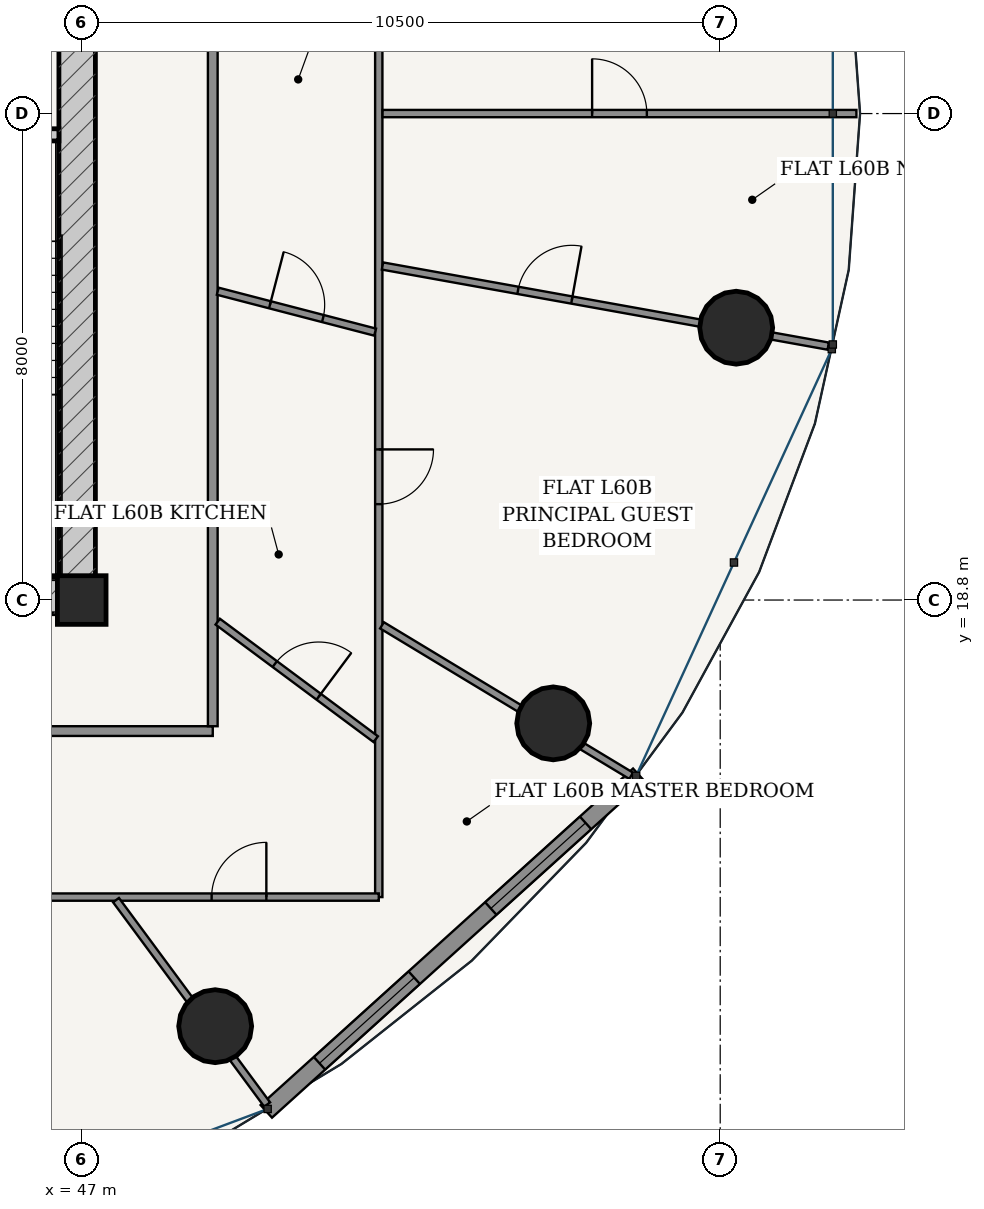
"""IFC4 building model, lengths in metres.
Left out: names, types, materials, properties, quantities, classifications, styles, units other than length and angle.
Written with IfcOpenShell. Run it as: python <this file> out.ifc"""

import sys

from ifc_helpers import new_model, si_unit, direction, frame, frame_2d, origin, origin_2d, place, context, subcontext, project, spatial, rectangle, hollow_circle, extrude, source, transform, mapped, element, fill, save


model = new_model("IFC4")
c1 = context("Model", 3, precision=1e-05, world=origin(), true_north=direction((-0.2419218956, 0.970295726276)))
c2 = subcontext(c1, "Body", "Model", "MODEL_VIEW")
j1 = project(units=[si_unit("LENGTHUNIT", "METRE"), si_unit("PLANEANGLEUNIT", "RADIAN")], contexts=[c1])
p1 = place(None, origin())
s1 = spatial("IfcSite", under=j1, at=p1, CompositionType="ELEMENT")
p2 = place(p1, origin())
s2 = spatial("IfcBuilding", under=s1, at=p2, CompositionType="ELEMENT")
p3 = place(p2, frame((0.0, 0.0, 228.2)))
s3 = spatial("IfcBuildingStorey", under=s2, at=p3, CompositionType="ELEMENT", Elevation=228.2)
p4 = place(p3, frame((47.0, 18.8, 0.0), z_axis=(0.0, 0.0, 1.0), x_axis=(1.0, 0.0, 0.0)))
e1 = element("IfcColumn", 1, at=p4, inside=s3, PredefinedType="COLUMN", context=c2, shape_type="SweptSolid", body=[
    extrude(rectangle(XDim=0.8, YDim=0.8, at=origin_2d()), origin(), (0.0, 0.0, 1.0), 3.7),
])
p5 = place(p3, frame((28.775, 18.875, 0.0), z_axis=(0.0, 0.0, 1.0), x_axis=(1.0, 0.0, 0.0)))
e2 = element("IfcWall", 2, at=p5, inside=s3, PredefinedType="SHEAR", context=c2, shape_type="SweptSolid", body=[
    extrude(rectangle(XDim=18.45, YDim=0.6, at=frame_2d((9.225, 0.0))), origin(), (0.0, 0.0, 1.0), 3.435),
])
p6 = place(p5, frame((8.8, 0.0, 0.0)))
e3 = element("IfcOpeningElement", 3, at=p6, cuts=e2, PredefinedType="OPENING", context=c2, shape_type="SweptSolid", body=[
    extrude(rectangle(XDim=0.85, YDim=2.1, at=frame_2d((0.425, 1.05))), frame((0.0, 0.31, 0.0), z_axis=(0.0, -1.0, 0.0), x_axis=(1.0, 0.0, 0.0)), (0.0, 0.0, 1.0), 0.62),
])
p7 = place(p3, frame((46.925, 19.175, 0.0), z_axis=(0.0, 0.0, 1.0), x_axis=(0.0, 1.0, 0.0)))
e4 = element("IfcWall", 4, at=p7, inside=s3, PredefinedType="SHEAR", context=c2, shape_type="SweptSolid", body=[
    extrude(rectangle(XDim=15.25, YDim=0.6, at=frame_2d((7.625, 0.0))), origin(), (0.0, 0.0, 1.0), 3.435),
])
p8 = place(p7, frame((9.875, 0.0, 0.0)))
e5 = element("IfcOpeningElement", 5, at=p8, cuts=e4, PredefinedType="OPENING", context=c2, shape_type="SweptSolid", body=[
    extrude(rectangle(XDim=1.5, YDim=2.2, at=frame_2d((0.75, 1.1))), frame((0.0, 0.31, 0.0), z_axis=(0.0, -1.0, 0.0), x_axis=(1.0, 0.0, 0.0)), (0.0, 0.0, 1.0), 0.62),
])
p9 = place(p3, frame((43.305, 26.45, 0.0), z_axis=(0.0, 0.0, 1.0), x_axis=(1.0, 0.0, 0.0)))
e6 = element("IfcWall", 6, at=p9, inside=s3, PredefinedType="SOLIDWALL", context=c2, shape_type="SweptSolid", body=[
    extrude(rectangle(XDim=3.32, YDim=0.2, at=frame_2d((1.66, 0.0))), origin(), (0.0, 0.0, 1.0), 3.435),
])
p10 = place(p9, frame((1.185, 0.0, 0.0)))
e7 = element("IfcOpeningElement", 7, at=p10, cuts=e6, PredefinedType="OPENING", context=c2, shape_type="SweptSolid", body=[
    extrude(rectangle(XDim=0.95, YDim=2.15, at=frame_2d((0.475, 1.075))), frame((0.0, 0.11, 0.0), z_axis=(0.0, -1.0, 0.0), x_axis=(1.0, 0.0, 0.0)), (0.0, 0.0, 1.0), 0.22),
])
for number, where, z_axis, x_axis in (
    (8, (49.195, 11.792, 0.0), (0.0, 0.0, 1.0), (1.0, 0.0, 0.0)),
    (9, (54.754, 16.772, 0.0), (0.0, 0.0, 1.0), (1.0, 0.0, 0.0)),
    (10, (57.763, 23.279, 0.0), (0.0, 0.0, 1.0), (1.0, 0.0, 0.0)),
):
    element("IfcColumn", number, at=place(p3, frame(where, z_axis=z_axis, x_axis=x_axis)), inside=s3, PredefinedType="COLUMN", context=c2, shape_type="SweptSolid", body=[
        extrude(hollow_circle(Radius=0.6, WallThickness=0.038, at=origin_2d()), origin(), (0.0, 0.0, 1.0), 3.7),
    ])
p11 = place(p3, frame((50.035, 10.391, 0.0), z_axis=(0.0, 0.0, 1.0), x_axis=(0.741986838603, 0.670414447443, 0.0)))
e11 = element("IfcWall", 11, at=p11, inside=s3, PredefinedType="SOLIDWALL", context=c2, shape_type="SweptSolid", body=[
    extrude(rectangle(XDim=8.255, YDim=0.28, at=frame_2d((4.127, 0.0))), origin(), (0.0, 0.0, 1.0), 3.435),
])
p12 = place(p11, frame((1.179, 0.0, 0.85)))
e12 = element("IfcOpeningElement", 12, at=p12, cuts=e11, PredefinedType="OPENING", context=c2, shape_type="SweptSolid", body=[
    extrude(rectangle(XDim=2.1, YDim=1.95, at=frame_2d((1.05, 0.975))), frame((0.0, 0.15, 0.0), z_axis=(0.0, -1.0, 0.0), x_axis=(1.0, 0.0, 0.0)), (0.0, 0.0, 1.0), 0.3),
])
p13 = place(p11, frame((4.976, 0.0, 0.85)))
e13 = element("IfcOpeningElement", 13, at=p13, cuts=e11, PredefinedType="OPENING", context=c2, shape_type="SweptSolid", body=[
    extrude(rectangle(XDim=2.1, YDim=1.95, at=frame_2d((1.05, 0.975))), frame((0.0, 0.15, 0.0), z_axis=(0.0, -1.0, 0.0), x_axis=(1.0, 0.0, 0.0)), (0.0, 0.0, 1.0), 0.3),
])
p14 = place(p3, frame((34.32, 16.645, 0.0), z_axis=(0.0, 0.0, 1.0), x_axis=(1.0, 0.0, 0.0)))
e14 = element("IfcWall", 14, at=p14, inside=s3, PredefinedType="PARTITIONING", context=c2, shape_type="SweptSolid", body=[
    extrude(rectangle(XDim=14.835, YDim=0.16, at=frame_2d((7.417, 0.0))), origin(), (0.0, 0.0, 1.0), 2.951),
])
p15 = place(p14, frame((10.135, 0.0, 0.0)))
e15 = element("IfcOpeningElement", 15, at=p15, cuts=e14, PredefinedType="OPENING", context=c2, shape_type="SweptSolid", body=[
    extrude(rectangle(XDim=0.98, YDim=2.2, at=frame_2d((0.49, 1.1))), frame((0.0, 0.09, 0.0), z_axis=(0.0, -1.0, 0.0), x_axis=(1.0, 0.0, 0.0)), (0.0, 0.0, 1.0), 0.18),
])
p16 = place(p3, frame((49.155, 16.725, 0.0), z_axis=(0.0, 0.0, 1.0), x_axis=(0.0, 1.0, 0.0)))
e16 = element("IfcWall", 16, at=p16, inside=s3, PredefinedType="PARTITIONING", context=c2, shape_type="SweptSolid", body=[
    extrude(rectangle(XDim=18.3, YDim=0.16, at=frame_2d((9.15, 0.0))), origin(), (0.0, 0.0, 1.0), 2.951),
])
p17 = place(p3, frame((51.885, 37.835, 0.0), z_axis=(0.0, 0.0, 1.0), x_axis=(0.0, -1.0, 0.0)))
e17 = element("IfcWall", 17, at=p17, inside=s3, PredefinedType="PARTITIONING", context=c2, shape_type="SweptSolid", body=[
    extrude(rectangle(XDim=23.92, YDim=0.12, at=frame_2d((11.96, 0.0))), origin(), (0.0, 0.0, 1.0), 2.951),
])
p18 = place(p17, frame((16.558, 0.0, 0.0)))
e18 = element("IfcOpeningElement", 18, at=p18, cuts=e17, PredefinedType="OPENING", context=c2, shape_type="SweptSolid", body=[
    extrude(rectangle(XDim=0.9, YDim=2.15, at=frame_2d((0.45, 1.075))), frame((0.0, 0.07, 0.0), z_axis=(0.0, -1.0, 0.0), x_axis=(1.0, 0.0, 0.0)), (0.0, 0.0, 1.0), 0.14),
])
p19 = place(p3, frame((51.885, 13.915, 0.0), z_axis=(0.0, 0.0, 1.0), x_axis=(-1.0, 0.0, 0.0)))
e19 = element("IfcWall", 19, at=p19, inside=s3, PredefinedType="PARTITIONING", context=c2, shape_type="SweptSolid", body=[
    extrude(rectangle(XDim=16.619, YDim=0.12, at=frame_2d((8.31, 0.0))), origin(), (0.0, 0.0, 1.0), 2.951),
])
p20 = place(p19, frame((6.797, 0.0, 0.0)))
e20 = element("IfcOpeningElement", 20, at=p20, cuts=e19, PredefinedType="OPENING", context=c2, shape_type="SweptSolid", body=[
    extrude(rectangle(XDim=0.9, YDim=2.15, at=frame_2d((0.45, 1.075))), frame((0.0, 0.07, 0.0), z_axis=(0.0, -1.0, 0.0), x_axis=(1.0, 0.0, 0.0)), (0.0, 0.0, 1.0), 0.14),
])
p21 = place(p19, frame((1.849, 0.0, 0.0)))
e21 = element("IfcOpeningElement", 21, at=p21, cuts=e19, PredefinedType="OPENING", context=c2, shape_type="SweptSolid", body=[
    extrude(rectangle(XDim=0.9, YDim=2.15, at=frame_2d((0.45, 1.075))), frame((0.0, 0.07, 0.0), z_axis=(0.0, -1.0, 0.0), x_axis=(1.0, 0.0, 0.0)), (0.0, 0.0, 1.0), 0.14),
])
p22 = place(p3, frame((47.564, 13.865, 0.0), z_axis=(0.0, 0.0, 1.0), x_axis=(0.594501071103, -0.804094818076, 0.0)))
e22 = element("IfcWall", 22, at=p22, inside=s3, PredefinedType="PARTITIONING", context=c2, shape_type="SweptSolid", body=[
    extrude(rectangle(XDim=4.181, YDim=0.12, at=frame_2d((2.09, 0.0))), origin(), (0.0, 0.0, 1.0), 2.951),
])
p23 = place(p3, frame((51.938, 18.384, 0.0), z_axis=(0.0, 0.0, 1.0), x_axis=(0.856058483833, -0.516878972543, 0.0)))
e23 = element("IfcWall", 23, at=p23, inside=s3, PredefinedType="PARTITIONING", context=c2, shape_type="SweptSolid", body=[
    extrude(rectangle(XDim=4.787, YDim=0.12, at=frame_2d((2.393, 0.0))), origin(), (0.0, 0.0, 1.0), 2.951),
])
p24 = place(p3, frame((51.946, 24.293, 0.0), z_axis=(0.0, 0.0, 1.0), x_axis=(0.984227185588, -0.176909149424, 0.0)))
e24 = element("IfcWall", 24, at=p24, inside=s3, PredefinedType="PARTITIONING", context=c2, shape_type="SweptSolid", body=[
    extrude(rectangle(XDim=7.448, YDim=0.12, at=frame_2d((3.724, 0.0))), origin(), (0.0, 0.0, 1.0), 2.951),
])
p25 = place(p24, frame((2.264, 0.0, 0.0)))
e25 = element("IfcOpeningElement", 25, at=p25, cuts=e24, PredefinedType="OPENING", context=c2, shape_type="SweptSolid", body=[
    extrude(rectangle(XDim=0.9, YDim=2.15, at=frame_2d((0.45, 1.075))), frame((0.0, 0.07, 0.0), z_axis=(0.0, -1.0, 0.0), x_axis=(1.0, 0.0, 0.0)), (0.0, 0.0, 1.0), 0.14),
])
p26 = place(p3, frame((51.947, 26.8, 0.0), z_axis=(0.0, 0.0, 1.0), x_axis=(1.0, 0.0, 0.0)))
e26 = element("IfcWall", 26, at=p26, inside=s3, PredefinedType="PARTITIONING", context=c2, shape_type="SweptSolid", body=[
    extrude(rectangle(XDim=7.793, YDim=0.12, at=frame_2d((3.896, 0.0))), origin(), (0.0, 0.0, 1.0), 2.951),
])
p27 = place(p26, frame((3.447, 0.0, 0.0)))
e27 = element("IfcOpeningElement", 27, at=p27, cuts=e26, PredefinedType="OPENING", context=c2, shape_type="SweptSolid", body=[
    extrude(rectangle(XDim=0.9, YDim=2.15, at=frame_2d((0.45, 1.075))), frame((0.0, 0.07, 0.0), z_axis=(0.0, -1.0, 0.0), x_axis=(1.0, 0.0, 0.0)), (0.0, 0.0, 1.0), 0.14),
])
p28 = place(p3, frame((49.237, 18.444, 0.0), z_axis=(0.0, 0.0, 1.0), x_axis=(0.802454010275, -0.596713969497, 0.0)))
e28 = element("IfcWall", 28, at=p28, inside=s3, PredefinedType="PARTITIONING", context=c2, shape_type="SweptSolid", body=[
    extrude(rectangle(XDim=3.238, YDim=0.12, at=frame_2d((1.619, 0.0))), origin(), (0.0, 0.0, 1.0), 3.11),
])
p29 = place(p28, frame((1.169, 0.0, 0.0)))
e29 = element("IfcOpeningElement", 29, at=p29, cuts=e28, PredefinedType="OPENING", context=c2, shape_type="SweptSolid", body=[
    extrude(rectangle(XDim=0.9, YDim=2.15, at=frame_2d((0.45, 1.075))), frame((0.0, 0.07, 0.0), z_axis=(0.0, -1.0, 0.0), x_axis=(1.0, 0.0, 0.0)), (0.0, 0.0, 1.0), 0.14),
])
p30 = place(p3, frame((49.237, 23.879, 0.0), z_axis=(0.0, 0.0, 1.0), x_axis=(0.967822506788, -0.251633851765, 0.0)))
e30 = element("IfcWall", 30, at=p30, inside=s3, PredefinedType="PARTITIONING", context=c2, shape_type="SweptSolid", body=[
    extrude(rectangle(XDim=2.674, YDim=0.12, at=frame_2d((1.337, 0.0))), origin(), (0.0, 0.0, 1.0), 3.435),
])
p31 = place(p30, frame((0.887, 0.0, 0.0)))
e31 = element("IfcOpeningElement", 31, at=p31, cuts=e30, PredefinedType="OPENING", context=c2, shape_type="SweptSolid", body=[
    extrude(rectangle(XDim=0.9, YDim=2.15, at=frame_2d((0.45, 1.075))), frame((0.0, 0.07, 0.0), z_axis=(0.0, -1.0, 0.0), x_axis=(1.0, 0.0, 0.0)), (0.0, 0.0, 1.0), 0.14),
])
m1 = source(origin(), c2, "Body", "SweptSolid", [
    extrude(rectangle(XDim=2.1, YDim=1.95, at=frame_2d((1.05, 0.975))), frame((0.0, 0.03, 0.0), z_axis=(0.0, -1.0, 0.0), x_axis=(1.0, 0.0, 0.0)), (0.0, 0.0, 1.0), 0.06),
])
p32 = place(p12, origin())
e32 = element("IfcWindow", 32, at=p32, inside=s3, PartitioningType="SINGLE_PANEL", PredefinedType="WINDOW", context=c2, shape_type="MappedRepresentation", body=[
    mapped(m1, transform((0.0, 0.0, 0.0), scale=1.0)),
])
fill(e12, e32)
p33 = place(p13, origin())
e33 = element("IfcWindow", 33, at=p33, inside=s3, PartitioningType="SINGLE_PANEL", PredefinedType="WINDOW", context=c2, shape_type="MappedRepresentation", body=[
    mapped(m1, transform((0.0, 0.0, 0.0), scale=1.0)),
])
fill(e13, e33)
m2 = source(origin(), c2, "Body", "SweptSolid", [
    extrude(rectangle(XDim=0.9, YDim=2.15, at=frame_2d((0.45, 1.075))), frame((0.0, 0.025, 0.0), z_axis=(0.0, -1.0, 0.0), x_axis=(1.0, 0.0, 0.0)), (0.0, 0.0, 1.0), 0.05),
])
p34 = place(p29, origin())
e34 = element("IfcDoor", 34, at=p34, inside=s3, OperationType="SINGLE_SWING_RIGHT", PredefinedType="DOOR", context=c2, shape_type="MappedRepresentation", body=[
    mapped(m2, transform((0.0, 0.0, 0.0), scale=1.0)),
])
fill(e29, e34)
p35 = place(p31, origin())
e35 = element("IfcDoor", 35, at=p35, inside=s3, OperationType="SINGLE_SWING_LEFT", PredefinedType="DOOR", context=c2, shape_type="MappedRepresentation", body=[
    mapped(m2, transform((0.0, 0.0, 0.0), scale=1.0)),
])
fill(e31, e35)
p36 = place(p21, frame((0.9, 0.0, 0.0), z_axis=(0.0, 0.0, 1.0), x_axis=(-1.0, 0.0, 0.0)))
e36 = element("IfcDoor", 36, at=p36, inside=s3, OperationType="SINGLE_SWING_RIGHT", PredefinedType="DOOR", context=c2, shape_type="MappedRepresentation", body=[
    mapped(m2, transform((0.0, 0.0, 0.0), scale=1.0)),
])
fill(e21, e36)
p37 = place(p18, origin())
e37 = element("IfcDoor", 37, at=p37, inside=s3, OperationType="SINGLE_SWING_LEFT", PredefinedType="DOOR", context=c2, shape_type="MappedRepresentation", body=[
    mapped(m2, transform((0.0, 0.0, 0.0), scale=1.0)),
])
fill(e18, e37)
p38 = place(p25, origin())
e38 = element("IfcDoor", 38, at=p38, inside=s3, OperationType="SINGLE_SWING_RIGHT", PredefinedType="DOOR", context=c2, shape_type="MappedRepresentation", body=[
    mapped(m2, transform((0.0, 0.0, 0.0), scale=1.0)),
])
fill(e25, e38)
p39 = place(p27, origin())
e39 = element("IfcDoor", 39, at=p39, inside=s3, OperationType="SINGLE_SWING_LEFT", PredefinedType="DOOR", context=c2, shape_type="MappedRepresentation", body=[
    mapped(m2, transform((0.0, 0.0, 0.0), scale=1.0)),
])
fill(e27, e39)
save(model, sys.argv[1])
